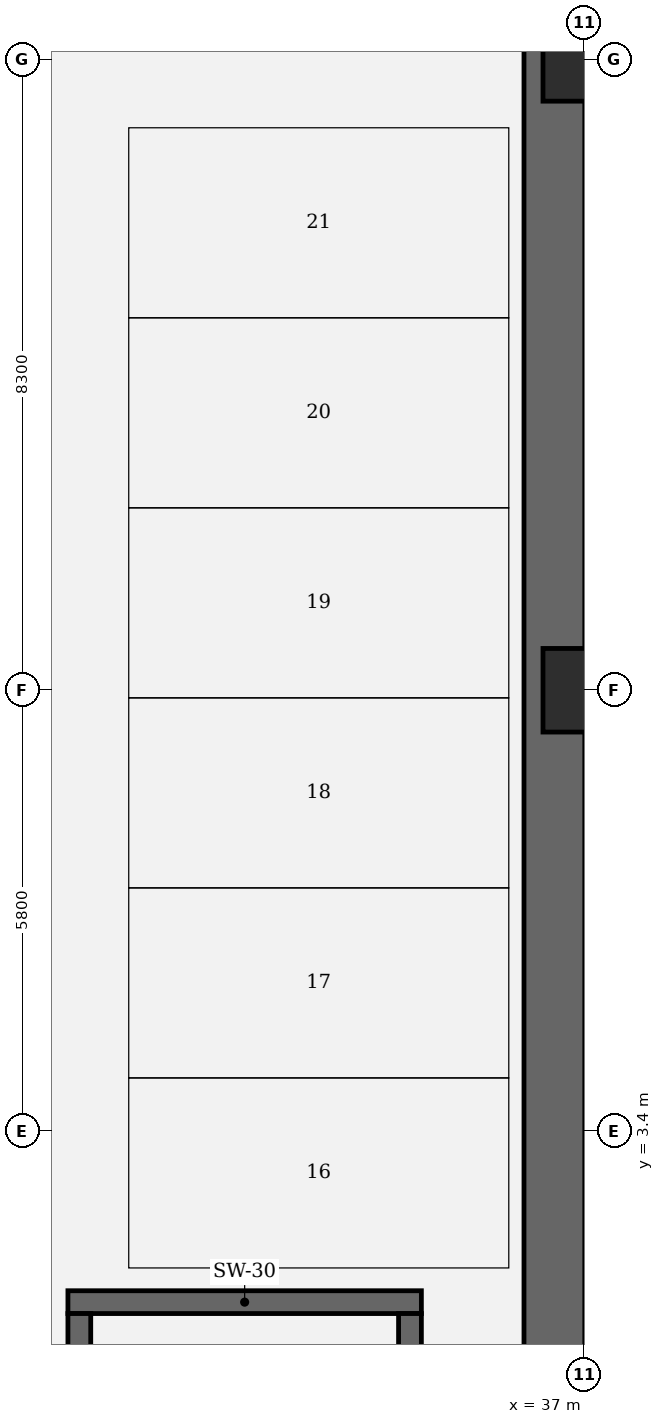
"""IFC4 building model, lengths in metres.
Left out: names, types, materials, properties, quantities, classifications, styles, units other than length and angle.
Written with IfcOpenShell. Run it as: python <this file> out.ifc"""

import sys

from ifc_helpers import new_model, si_unit, direction, frame, frame_2d, origin, origin_2d, place, context, subcontext, project, spatial, rectangle, extrude, element, save


model = new_model("IFC4")
c1 = context("Model", 3, precision=1e-05, world=origin(), true_north=direction((0.0, 1.0)))
c2 = subcontext(c1, "Body", "Model", "MODEL_VIEW")
j1 = project(units=[si_unit("LENGTHUNIT", "METRE"), si_unit("PLANEANGLEUNIT", "RADIAN")], contexts=[c1])
p1 = place(None, origin())
s1 = spatial("IfcSite", under=j1, at=p1, CompositionType="ELEMENT")
p2 = place(p1, origin())
s2 = spatial("IfcBuilding", under=s1, at=p2, CompositionType="ELEMENT")
p3 = place(p2, frame((0.0, 0.0, -9.6)))
s3 = spatial("IfcBuildingStorey", under=s2, at=p3, CompositionType="ELEMENT", Elevation=-9.6)
p4 = place(p3, frame((34.85, 1.15, 0.0), z_axis=(0.0, 0.0, 1.0), x_axis=(-1.0, 0.0, 0.0)))
e1 = element("IfcWall", 1, at=p4, inside=s3, PredefinedType="SOLIDWALL", context=c2, shape_type="SweptSolid", body=[
    extrude(rectangle(XDim=4.65, YDim=0.3, at=frame_2d((2.325, 0.0))), origin(), (0.0, 0.0, 1.0), 4.8),
])
for number, where, z_axis, x_axis in (
    (2, (30.35, -8.8, 0.0), (0.0, 0.0, 1.0), (0.0, 1.0, 0.0)),
    (3, (34.7, 1.0, 0.0), (0.0, 0.0, 1.0), (0.0, -1.0, 0.0)),
):
    element("IfcWall", number, at=place(p3, frame(where, z_axis=z_axis, x_axis=x_axis)), inside=s3, PredefinedType="SOLIDWALL", context=c2, shape_type="SweptSolid", body=[
        extrude(rectangle(XDim=9.8, YDim=0.3, at=frame_2d((4.9, 0.0))), origin(), (0.0, 0.0, 1.0), 4.8),
    ])
for number, where, z_axis, x_axis in (
    (4, (37.0, 9.2, 0.0), (0.0, 0.0, 1.0), (1.0, 0.0, 0.0)),
    (5, (37.0, 17.5, 0.0), (0.0, 0.0, 1.0), (1.0, 0.0, 0.0)),
):
    element("IfcColumn", number, at=place(p3, frame(where, z_axis=z_axis, x_axis=x_axis)), inside=s3, PredefinedType="COLUMN", context=c2, shape_type="SweptSolid", body=[
        extrude(rectangle(XDim=1.1, YDim=1.1, at=origin_2d()), origin(), (0.0, 0.0, 1.0), 4.8),
    ])
p5 = place(p3, frame((36.6, 24.2, 0.0), z_axis=(0.0, 0.0, 1.0), x_axis=(0.0, -1.0, 0.0)))
e6 = element("IfcWall", 6, at=p5, inside=s3, PredefinedType="USERDEFINED", context=c2, shape_type="SweptSolid", body=[
    extrude(rectangle(XDim=48.4, YDim=0.8, at=frame_2d((24.2, 0.0))), origin(), (0.0, 0.0, 1.0), 4.8),
])
save(model, sys.argv[1])
